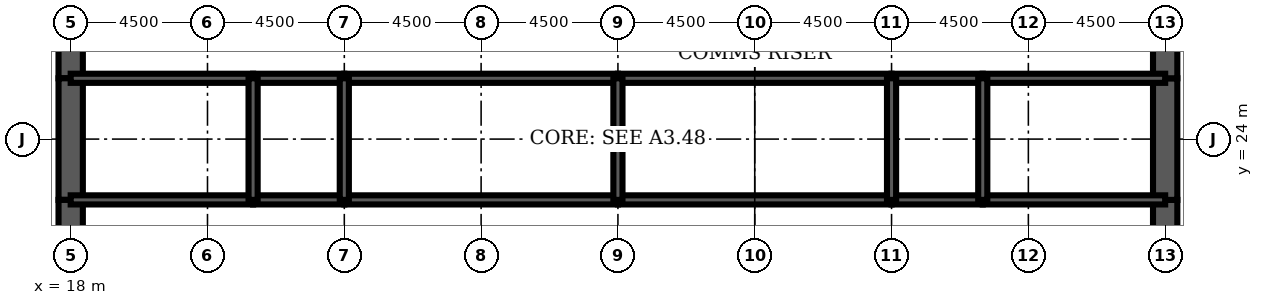
"""IFC4 building model, lengths in metres.
Left out: names, types, materials, properties, quantities, classifications, styles, units other than length and angle.
Written with IfcOpenShell. Run it as: python <this file> out.ifc"""

import sys

from ifc_helpers import new_model, si_unit, direction, frame, frame_2d, origin, place, context, subcontext, project, spatial, rectangle, extrude, element, fill, save


model = new_model("IFC4")
c1 = context("Model", 3, precision=1e-05, world=origin(), true_north=direction((0.0, 1.0)))
c2 = subcontext(c1, "Body", "Model", "MODEL_VIEW")
j1 = project(units=[si_unit("LENGTHUNIT", "METRE"), si_unit("PLANEANGLEUNIT", "RADIAN")], contexts=[c1])
p1 = place(None, origin())
s1 = spatial("IfcSite", under=j1, at=p1, CompositionType="ELEMENT")
p2 = place(p1, origin())
s2 = spatial("IfcBuilding", under=s1, at=p2, CompositionType="ELEMENT")
p3 = place(p2, frame((0.0, 0.0, 206.8)))
s3 = spatial("IfcBuildingStorey", under=s2, at=p3, CompositionType="ELEMENT", Elevation=206.8)
p4 = place(p3, frame((18.0, 28.8, 0.0), z_axis=(0.0, 0.0, 1.0), x_axis=(0.0, -1.0, 0.0)))
e1 = element("IfcWall", 1, at=p4, inside=s3, PredefinedType="SHEAR", context=c2, shape_type="SweptSolid", body=[
    extrude(rectangle(XDim=2.8, YDim=0.8, at=frame_2d((1.4, 0.0))), origin(), (0.0, 0.0, 1.0), 4.2),
])
p5 = place(p4, frame((0.4, 0.0, 0.0)))
e2 = element("IfcOpeningElement", 2, at=p5, cuts=e1, PredefinedType="OPENING", context=c2, shape_type="SweptSolid", body=[
    extrude(rectangle(XDim=1.8, YDim=2.1, at=frame_2d((0.9, 1.05))), frame((0.0, 0.41, 0.0), z_axis=(0.0, -1.0, 0.0), x_axis=(1.0, 0.0, 0.0)), (0.0, 0.0, 1.0), 0.82),
])
p6 = place(p3, frame((18.0, 26.0, 0.0), z_axis=(0.0, 0.0, 1.0), x_axis=(0.0, -1.0, 0.0)))
e3 = element("IfcWall", 3, at=p6, inside=s3, PredefinedType="SHEAR", context=c2, shape_type="SweptSolid", body=[
    extrude(rectangle(XDim=4.0, YDim=0.8, at=frame_2d((2.0, 0.0))), origin(), (0.0, 0.0, 1.0), 4.2),
])
p7 = place(p3, frame((18.0, 22.0, 0.0), z_axis=(0.0, 0.0, 1.0), x_axis=(0.0, -1.0, 0.0)))
e4 = element("IfcWall", 4, at=p7, inside=s3, PredefinedType="SHEAR", context=c2, shape_type="SweptSolid", body=[
    extrude(rectangle(XDim=2.8, YDim=0.8, at=frame_2d((1.4, 0.0))), origin(), (0.0, 0.0, 1.0), 4.2),
])
p8 = place(p7, frame((0.6, 0.0, 0.0)))
e5 = element("IfcOpeningElement", 5, at=p8, cuts=e4, PredefinedType="OPENING", context=c2, shape_type="SweptSolid", body=[
    extrude(rectangle(XDim=1.8, YDim=2.1, at=frame_2d((0.9, 1.05))), frame((0.0, 0.41, 0.0), z_axis=(0.0, -1.0, 0.0), x_axis=(1.0, 0.0, 0.0)), (0.0, 0.0, 1.0), 0.82),
])
p9 = place(p3, frame((54.0, 19.2, 0.0), z_axis=(0.0, 0.0, 1.0), x_axis=(0.0, 1.0, 0.0)))
e6 = element("IfcWall", 6, at=p9, inside=s3, PredefinedType="SHEAR", context=c2, shape_type="SweptSolid", body=[
    extrude(rectangle(XDim=2.8, YDim=0.8, at=frame_2d((1.4, 0.0))), origin(), (0.0, 0.0, 1.0), 4.2),
])
p10 = place(p9, frame((0.4, 0.0, 0.0)))
e7 = element("IfcOpeningElement", 7, at=p10, cuts=e6, PredefinedType="OPENING", context=c2, shape_type="SweptSolid", body=[
    extrude(rectangle(XDim=1.8, YDim=2.1, at=frame_2d((0.9, 1.05))), frame((0.0, 0.41, 0.0), z_axis=(0.0, -1.0, 0.0), x_axis=(1.0, 0.0, 0.0)), (0.0, 0.0, 1.0), 0.82),
])
p11 = place(p3, frame((54.0, 22.0, 0.0), z_axis=(0.0, 0.0, 1.0), x_axis=(0.0, 1.0, 0.0)))
e8 = element("IfcWall", 8, at=p11, inside=s3, PredefinedType="SHEAR", context=c2, shape_type="SweptSolid", body=[
    extrude(rectangle(XDim=4.0, YDim=0.8, at=frame_2d((2.0, 0.0))), origin(), (0.0, 0.0, 1.0), 4.2),
])
p12 = place(p3, frame((54.0, 26.0, 0.0), z_axis=(0.0, 0.0, 1.0), x_axis=(0.0, 1.0, 0.0)))
e9 = element("IfcWall", 9, at=p12, inside=s3, PredefinedType="SHEAR", context=c2, shape_type="SweptSolid", body=[
    extrude(rectangle(XDim=2.8, YDim=0.8, at=frame_2d((1.4, 0.0))), origin(), (0.0, 0.0, 1.0), 4.2),
])
p13 = place(p12, frame((0.6, 0.0, 0.0)))
e10 = element("IfcOpeningElement", 10, at=p13, cuts=e9, PredefinedType="OPENING", context=c2, shape_type="SweptSolid", body=[
    extrude(rectangle(XDim=1.8, YDim=2.1, at=frame_2d((0.9, 1.05))), frame((0.0, 0.41, 0.0), z_axis=(0.0, -1.0, 0.0), x_axis=(1.0, 0.0, 0.0)), (0.0, 0.0, 1.0), 0.82),
])
p14 = place(p3, frame((18.0, 22.0, 0.0), z_axis=(0.0, 0.0, 1.0), x_axis=(1.0, 0.0, 0.0)))
e11 = element("IfcWall", 11, at=p14, inside=s3, PredefinedType="SOLIDWALL", context=c2, shape_type="SweptSolid", body=[
    extrude(rectangle(XDim=6.0, YDim=0.3, at=frame_2d((3.0, 0.0))), origin(), (0.0, 0.0, 1.0), 4.2),
])
p15 = place(p14, frame((4.4, 0.0, 0.0)))
e12 = element("IfcOpeningElement", 12, at=p15, cuts=e11, PredefinedType="OPENING", context=c2, shape_type="SweptSolid", body=[
    extrude(rectangle(XDim=1.0, YDim=2.1, at=frame_2d((0.5, 1.05))), frame((0.0, 0.16, 0.0), z_axis=(0.0, -1.0, 0.0), x_axis=(1.0, 0.0, 0.0)), (0.0, 0.0, 1.0), 0.32),
])
p16 = place(p14, frame((0.95, 0.0, 0.0)))
e13 = element("IfcOpeningElement", 13, at=p16, cuts=e11, PredefinedType="OPENING", context=c2, shape_type="SweptSolid", body=[
    extrude(rectangle(XDim=1.0, YDim=2.1, at=frame_2d((0.5, 1.05))), frame((0.0, 0.16, 0.0), z_axis=(0.0, -1.0, 0.0), x_axis=(1.0, 0.0, 0.0)), (0.0, 0.0, 1.0), 0.32),
])
p17 = place(p3, frame((24.0, 22.0, 0.0), z_axis=(0.0, 0.0, 1.0), x_axis=(1.0, 0.0, 0.0)))
e14 = element("IfcWall", 14, at=p17, inside=s3, PredefinedType="SOLIDWALL", context=c2, shape_type="SweptSolid", body=[
    extrude(rectangle(XDim=3.0, YDim=0.3, at=frame_2d((1.5, 0.0))), origin(), (0.0, 0.0, 1.0), 4.2),
])
p18 = place(p17, frame((1.0, 0.0, 0.0)))
e15 = element("IfcOpeningElement", 15, at=p18, cuts=e14, PredefinedType="OPENING", context=c2, shape_type="SweptSolid", body=[
    extrude(rectangle(XDim=1.0, YDim=2.1, at=frame_2d((0.5, 1.05))), frame((0.0, 0.16, 0.0), z_axis=(0.0, -1.0, 0.0), x_axis=(1.0, 0.0, 0.0)), (0.0, 0.0, 1.0), 0.32),
])
p19 = place(p3, frame((27.0, 22.0, 0.0), z_axis=(0.0, 0.0, 1.0), x_axis=(1.0, 0.0, 0.0)))
e16 = element("IfcWall", 16, at=p19, inside=s3, PredefinedType="SOLIDWALL", context=c2, shape_type="SweptSolid", body=[
    extrude(rectangle(XDim=9.0, YDim=0.3, at=frame_2d((4.5, 0.0))), origin(), (0.0, 0.0, 1.0), 4.2),
])
p20 = place(p19, frame((4.0, 0.0, 0.0)))
e17 = element("IfcOpeningElement", 17, at=p20, cuts=e16, PredefinedType="OPENING", context=c2, shape_type="SweptSolid", body=[
    extrude(rectangle(XDim=1.0, YDim=2.1, at=frame_2d((0.5, 1.05))), frame((0.0, 0.16, 0.0), z_axis=(0.0, -1.0, 0.0), x_axis=(1.0, 0.0, 0.0)), (0.0, 0.0, 1.0), 0.32),
])
p21 = place(p3, frame((36.0, 22.0, 0.0), z_axis=(0.0, 0.0, 1.0), x_axis=(1.0, 0.0, 0.0)))
e18 = element("IfcWall", 18, at=p21, inside=s3, PredefinedType="SOLIDWALL", context=c2, shape_type="SweptSolid", body=[
    extrude(rectangle(XDim=9.0, YDim=0.3, at=frame_2d((4.5, 0.0))), origin(), (0.0, 0.0, 1.0), 4.2),
])
p22 = place(p21, frame((4.0, 0.0, 0.0)))
e19 = element("IfcOpeningElement", 19, at=p22, cuts=e18, PredefinedType="OPENING", context=c2, shape_type="SweptSolid", body=[
    extrude(rectangle(XDim=1.0, YDim=2.1, at=frame_2d((0.5, 1.05))), frame((0.0, 0.16, 0.0), z_axis=(0.0, -1.0, 0.0), x_axis=(1.0, 0.0, 0.0)), (0.0, 0.0, 1.0), 0.32),
])
p23 = place(p3, frame((45.0, 22.0, 0.0), z_axis=(0.0, 0.0, 1.0), x_axis=(1.0, 0.0, 0.0)))
e20 = element("IfcWall", 20, at=p23, inside=s3, PredefinedType="SOLIDWALL", context=c2, shape_type="SweptSolid", body=[
    extrude(rectangle(XDim=3.0, YDim=0.3, at=frame_2d((1.5, 0.0))), origin(), (0.0, 0.0, 1.0), 4.2),
])
p24 = place(p23, frame((1.0, 0.0, 0.0)))
e21 = element("IfcOpeningElement", 21, at=p24, cuts=e20, PredefinedType="OPENING", context=c2, shape_type="SweptSolid", body=[
    extrude(rectangle(XDim=1.0, YDim=2.1, at=frame_2d((0.5, 1.05))), frame((0.0, 0.16, 0.0), z_axis=(0.0, -1.0, 0.0), x_axis=(1.0, 0.0, 0.0)), (0.0, 0.0, 1.0), 0.32),
])
p25 = place(p3, frame((48.0, 22.0, 0.0), z_axis=(0.0, 0.0, 1.0), x_axis=(1.0, 0.0, 0.0)))
e22 = element("IfcWall", 22, at=p25, inside=s3, PredefinedType="SOLIDWALL", context=c2, shape_type="SweptSolid", body=[
    extrude(rectangle(XDim=6.0, YDim=0.3, at=frame_2d((3.0, 0.0))), origin(), (0.0, 0.0, 1.0), 4.2),
])
p26 = place(p25, frame((2.0, 0.0, 0.0)))
e23 = element("IfcOpeningElement", 23, at=p26, cuts=e22, PredefinedType="OPENING", context=c2, shape_type="SweptSolid", body=[
    extrude(rectangle(XDim=1.0, YDim=2.1, at=frame_2d((0.5, 1.05))), frame((0.0, 0.16, 0.0), z_axis=(0.0, -1.0, 0.0), x_axis=(1.0, 0.0, 0.0)), (0.0, 0.0, 1.0), 0.32),
])
p27 = place(p25, frame((4.35, 0.0, 0.0)))
e24 = element("IfcOpeningElement", 24, at=p27, cuts=e22, PredefinedType="OPENING", context=c2, shape_type="SweptSolid", body=[
    extrude(rectangle(XDim=1.0, YDim=2.1, at=frame_2d((0.5, 1.05))), frame((0.0, 0.16, 0.0), z_axis=(0.0, -1.0, 0.0), x_axis=(1.0, 0.0, 0.0)), (0.0, 0.0, 1.0), 0.32),
])
p28 = place(p3, frame((18.0, 26.0, 0.0), z_axis=(0.0, 0.0, 1.0), x_axis=(1.0, 0.0, 0.0)))
e25 = element("IfcWall", 25, at=p28, inside=s3, PredefinedType="SOLIDWALL", context=c2, shape_type="SweptSolid", body=[
    extrude(rectangle(XDim=6.0, YDim=0.3, at=frame_2d((3.0, 0.0))), origin(), (0.0, 0.0, 1.0), 4.2),
])
p29 = place(p3, frame((24.0, 26.0, 0.0), z_axis=(0.0, 0.0, 1.0), x_axis=(1.0, 0.0, 0.0)))
e26 = element("IfcWall", 26, at=p29, inside=s3, PredefinedType="SOLIDWALL", context=c2, shape_type="SweptSolid", body=[
    extrude(rectangle(XDim=3.0, YDim=0.3, at=frame_2d((1.5, 0.0))), origin(), (0.0, 0.0, 1.0), 4.2),
])
for number, where, z_axis, x_axis in (
    (27, (27.0, 26.0, 0.0), (0.0, 0.0, 1.0), (1.0, 0.0, 0.0)),
    (28, (36.0, 26.0, 0.0), (0.0, 0.0, 1.0), (1.0, 0.0, 0.0)),
):
    element("IfcWall", number, at=place(p3, frame(where, z_axis=z_axis, x_axis=x_axis)), inside=s3, PredefinedType="SOLIDWALL", context=c2, shape_type="SweptSolid", body=[
        extrude(rectangle(XDim=9.0, YDim=0.3, at=frame_2d((4.5, 0.0))), origin(), (0.0, 0.0, 1.0), 4.2),
    ])
p30 = place(p3, frame((45.0, 26.0, 0.0), z_axis=(0.0, 0.0, 1.0), x_axis=(1.0, 0.0, 0.0)))
e29 = element("IfcWall", 29, at=p30, inside=s3, PredefinedType="SOLIDWALL", context=c2, shape_type="SweptSolid", body=[
    extrude(rectangle(XDim=3.0, YDim=0.3, at=frame_2d((1.5, 0.0))), origin(), (0.0, 0.0, 1.0), 4.2),
])
p31 = place(p3, frame((48.0, 26.0, 0.0), z_axis=(0.0, 0.0, 1.0), x_axis=(1.0, 0.0, 0.0)))
e30 = element("IfcWall", 30, at=p31, inside=s3, PredefinedType="SOLIDWALL", context=c2, shape_type="SweptSolid", body=[
    extrude(rectangle(XDim=6.0, YDim=0.3, at=frame_2d((3.0, 0.0))), origin(), (0.0, 0.0, 1.0), 4.2),
])
for number, where, z_axis, x_axis in (
    (31, (24.0, 22.0, 0.0), (0.0, 0.0, 1.0), (0.0, 1.0, 0.0)),
    (32, (27.0, 22.0, 0.0), (0.0, 0.0, 1.0), (0.0, 1.0, 0.0)),
    (33, (36.0, 22.0, 0.0), (0.0, 0.0, 1.0), (0.0, 1.0, 0.0)),
    (34, (45.0, 22.0, 0.0), (0.0, 0.0, 1.0), (0.0, 1.0, 0.0)),
    (35, (48.0, 22.0, 0.0), (0.0, 0.0, 1.0), (0.0, 1.0, 0.0)),
):
    element("IfcWall", number, at=place(p3, frame(where, z_axis=z_axis, x_axis=x_axis)), inside=s3, PredefinedType="SOLIDWALL", context=c2, shape_type="SweptSolid", body=[
        extrude(rectangle(XDim=4.0, YDim=0.3, at=frame_2d((2.0, 0.0))), origin(), (0.0, 0.0, 1.0), 4.2),
    ])
p32 = place(p3, frame((38.0, 22.15, 0.0), z_axis=(0.0, 0.0, 1.0), x_axis=(0.0, 1.0, 0.0)))
e36 = element("IfcWall", 36, at=p32, inside=s3, PredefinedType="PARTITIONING", context=c2, shape_type="SweptSolid", body=[
    extrude(rectangle(XDim=3.7, YDim=0.15, at=frame_2d((1.85, 0.0))), origin(), (0.0, 0.0, 1.0), 3.0),
])
p33 = place(p32, frame((2.2, 0.0, 0.0)))
e37 = element("IfcOpeningElement", 37, at=p33, cuts=e36, PredefinedType="OPENING", context=c2, shape_type="SweptSolid", body=[
    extrude(rectangle(XDim=1.0, YDim=2.1, at=frame_2d((0.5, 1.05))), frame((0.0, 0.085, 0.0), z_axis=(0.0, -1.0, 0.0), x_axis=(1.0, 0.0, 0.0)), (0.0, 0.0, 1.0), 0.17),
])
for number, where, z_axis, x_axis in (
    (38, (20.575, 22.15, 0.0), (0.0, 0.0, 1.0), (0.0, 1.0, 0.0)),
    (39, (52.025, 22.15, 0.0), (0.0, 0.0, 1.0), (0.0, 1.0, 0.0)),
):
    element("IfcWall", number, at=place(p3, frame(where, z_axis=z_axis, x_axis=x_axis)), inside=s3, PredefinedType="PARTITIONING", context=c2, shape_type="SweptSolid", body=[
        extrude(rectangle(XDim=3.7, YDim=0.15, at=frame_2d((1.85, 0.0))), origin(), (0.0, 0.0, 1.0), 3.0),
    ])
p34 = place(p33, origin())
e40 = element("IfcDoor", 40, at=p34, inside=s3, OperationType="SINGLE_SWING_RIGHT", PredefinedType="DOOR", context=c2, shape_type="SweptSolid", body=[
    extrude(rectangle(XDim=1.0, YDim=2.1, at=frame_2d((0.5, 1.05))), frame((0.0, 0.025, 0.0), z_axis=(0.0, -1.0, 0.0), x_axis=(1.0, 0.0, 0.0)), (0.0, 0.0, 1.0), 0.05),
])
fill(e37, e40)
p35 = place(p8, origin())
e41 = element("IfcDoor", 41, at=p35, inside=s3, OperationType="SINGLE_SWING_LEFT", PredefinedType="DOOR", context=c2, shape_type="SweptSolid", body=[
    extrude(rectangle(XDim=1.8, YDim=2.1, at=frame_2d((0.9, 1.05))), frame((0.0, 0.4, 0.0), z_axis=(0.0, -1.0, 0.0), x_axis=(1.0, 0.0, 0.0)), (0.0, 0.0, 1.0), 0.8),
])
fill(e5, e41)
p36 = place(p5, origin())
e42 = element("IfcDoor", 42, at=p36, inside=s3, OperationType="SINGLE_SWING_LEFT", PredefinedType="DOOR", context=c2, shape_type="SweptSolid", body=[
    extrude(rectangle(XDim=1.8, YDim=2.1, at=frame_2d((0.9, 1.05))), frame((0.0, 0.4, 0.0), z_axis=(0.0, -1.0, 0.0), x_axis=(1.0, 0.0, 0.0)), (0.0, 0.0, 1.0), 0.8),
])
fill(e2, e42)
p37 = place(p10, origin())
e43 = element("IfcDoor", 43, at=p37, inside=s3, OperationType="SINGLE_SWING_LEFT", PredefinedType="DOOR", context=c2, shape_type="SweptSolid", body=[
    extrude(rectangle(XDim=1.8, YDim=2.1, at=frame_2d((0.9, 1.05))), frame((0.0, 0.4, 0.0), z_axis=(0.0, -1.0, 0.0), x_axis=(1.0, 0.0, 0.0)), (0.0, 0.0, 1.0), 0.8),
])
fill(e7, e43)
p38 = place(p13, origin())
e44 = element("IfcDoor", 44, at=p38, inside=s3, OperationType="SINGLE_SWING_LEFT", PredefinedType="DOOR", context=c2, shape_type="SweptSolid", body=[
    extrude(rectangle(XDim=1.8, YDim=2.1, at=frame_2d((0.9, 1.05))), frame((0.0, 0.4, 0.0), z_axis=(0.0, -1.0, 0.0), x_axis=(1.0, 0.0, 0.0)), (0.0, 0.0, 1.0), 0.8),
])
fill(e10, e44)
p39 = place(p15, origin())
e45 = element("IfcDoor", 45, at=p39, inside=s3, OperationType="SINGLE_SWING_RIGHT", PredefinedType="DOOR", context=c2, shape_type="SweptSolid", body=[
    extrude(rectangle(XDim=1.0, YDim=2.1, at=frame_2d((0.5, 1.05))), frame((0.0, 0.025, 0.0), z_axis=(0.0, -1.0, 0.0), x_axis=(1.0, 0.0, 0.0)), (0.0, 0.0, 1.0), 0.05),
])
fill(e12, e45)
p40 = place(p18, origin())
e46 = element("IfcDoor", 46, at=p40, inside=s3, OperationType="SINGLE_SWING_LEFT", PredefinedType="DOOR", context=c2, shape_type="SweptSolid", body=[
    extrude(rectangle(XDim=1.0, YDim=2.1, at=frame_2d((0.5, 1.05))), frame((0.0, 0.025, 0.0), z_axis=(0.0, -1.0, 0.0), x_axis=(1.0, 0.0, 0.0)), (0.0, 0.0, 1.0), 0.05),
])
fill(e15, e46)
p41 = place(p20, origin())
e47 = element("IfcDoor", 47, at=p41, inside=s3, OperationType="SINGLE_SWING_LEFT", PredefinedType="DOOR", context=c2, shape_type="SweptSolid", body=[
    extrude(rectangle(XDim=1.0, YDim=2.1, at=frame_2d((0.5, 1.05))), frame((0.0, 0.025, 0.0), z_axis=(0.0, -1.0, 0.0), x_axis=(1.0, 0.0, 0.0)), (0.0, 0.0, 1.0), 0.05),
])
fill(e17, e47)
p42 = place(p22, origin())
e48 = element("IfcDoor", 48, at=p42, inside=s3, OperationType="SINGLE_SWING_LEFT", PredefinedType="DOOR", context=c2, shape_type="SweptSolid", body=[
    extrude(rectangle(XDim=1.0, YDim=2.1, at=frame_2d((0.5, 1.05))), frame((0.0, 0.025, 0.0), z_axis=(0.0, -1.0, 0.0), x_axis=(1.0, 0.0, 0.0)), (0.0, 0.0, 1.0), 0.05),
])
fill(e19, e48)
p43 = place(p24, origin())
e49 = element("IfcDoor", 49, at=p43, inside=s3, OperationType="SINGLE_SWING_LEFT", PredefinedType="DOOR", context=c2, shape_type="SweptSolid", body=[
    extrude(rectangle(XDim=1.0, YDim=2.1, at=frame_2d((0.5, 1.05))), frame((0.0, 0.025, 0.0), z_axis=(0.0, -1.0, 0.0), x_axis=(1.0, 0.0, 0.0)), (0.0, 0.0, 1.0), 0.05),
])
fill(e21, e49)
p44 = place(p26, origin())
e50 = element("IfcDoor", 50, at=p44, inside=s3, OperationType="SINGLE_SWING_LEFT", PredefinedType="DOOR", context=c2, shape_type="SweptSolid", body=[
    extrude(rectangle(XDim=1.0, YDim=2.1, at=frame_2d((0.5, 1.05))), frame((0.0, 0.025, 0.0), z_axis=(0.0, -1.0, 0.0), x_axis=(1.0, 0.0, 0.0)), (0.0, 0.0, 1.0), 0.05),
])
fill(e23, e50)
p45 = place(p16, origin())
e51 = element("IfcDoor", 51, at=p45, inside=s3, OperationType="SINGLE_SWING_LEFT", PredefinedType="DOOR", context=c2, shape_type="SweptSolid", body=[
    extrude(rectangle(XDim=1.0, YDim=2.1, at=frame_2d((0.5, 1.05))), frame((0.0, 0.025, 0.0), z_axis=(0.0, -1.0, 0.0), x_axis=(1.0, 0.0, 0.0)), (0.0, 0.0, 1.0), 0.05),
])
fill(e13, e51)
p46 = place(p27, origin())
e52 = element("IfcDoor", 52, at=p46, inside=s3, OperationType="SINGLE_SWING_RIGHT", PredefinedType="DOOR", context=c2, shape_type="SweptSolid", body=[
    extrude(rectangle(XDim=1.0, YDim=2.1, at=frame_2d((0.5, 1.05))), frame((0.0, 0.025, 0.0), z_axis=(0.0, -1.0, 0.0), x_axis=(1.0, 0.0, 0.0)), (0.0, 0.0, 1.0), 0.05),
])
fill(e24, e52)
save(model, sys.argv[1])
